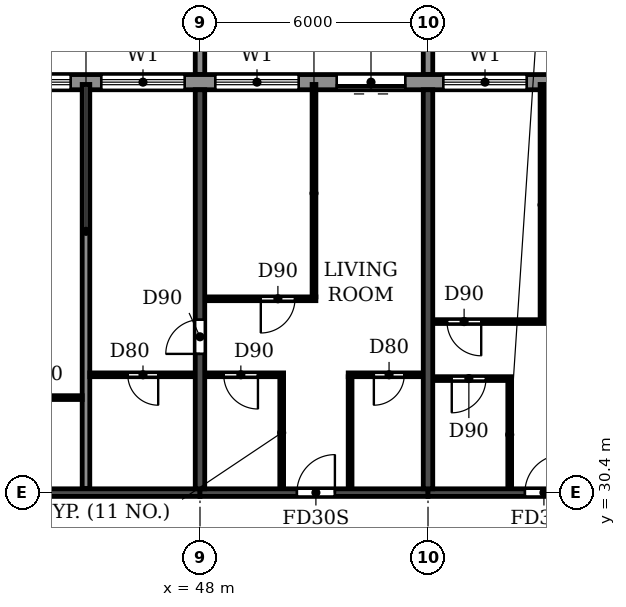
"""IFC4 building model, lengths in metres.
Left out: names, types, materials, properties, quantities, classifications, styles, units other than length and angle.
Written with IfcOpenShell. Run it as: python <this file> out.ifc"""

import sys

from ifc_helpers import new_model, si_unit, direction, frame, frame_2d, origin, place, context, subcontext, project, spatial, polyline, rectangle, outline, extrude, source, transform, mapped, element, fill, save


model = new_model("IFC4")
c1 = context("Model", 3, precision=1e-05, world=origin(), true_north=direction((0.0, 1.0)))
c2 = subcontext(c1, "Body", "Model", "MODEL_VIEW")
j1 = project(units=[si_unit("LENGTHUNIT", "METRE"), si_unit("PLANEANGLEUNIT", "RADIAN")], contexts=[c1])
p1 = place(None, origin())
s1 = spatial("IfcSite", under=j1, at=p1, CompositionType="ELEMENT")
p2 = place(p1, origin())
s2 = spatial("IfcBuilding", under=s1, at=p2, CompositionType="ELEMENT")
p3 = place(p2, frame((0.0, 0.0, 175.2)))
s3 = spatial("IfcBuildingStorey", under=s2, at=p3, CompositionType="ELEMENT", Elevation=175.2)
p4 = place(p3, frame((48.0, 30.5, 0.0), z_axis=(0.0, 0.0, 1.0), x_axis=(0.0, 1.0, 0.0)))
e1 = element("IfcWall", 1, at=p4, inside=s3, PredefinedType="SHEAR", context=c2, shape_type="SweptSolid", body=[
    extrude(rectangle(XDim=10.5, YDim=0.25, at=frame_2d((5.25, 0.0))), origin(), (0.0, 0.0, 1.0), 3.08),
])
p5 = place(p4, frame((3.55, 0.0, 0.0)))
e2 = element("IfcOpeningElement", 2, at=p5, cuts=e1, PredefinedType="OPENING", context=c2, shape_type="SweptSolid", body=[
    extrude(rectangle(XDim=0.9, YDim=2.1, at=frame_2d((0.45, 1.05))), frame((0.0, 0.135, 0.0), z_axis=(0.0, -1.0, 0.0), x_axis=(1.0, 0.0, 0.0)), (0.0, 0.0, 1.0), 0.27),
])
p6 = place(p3, frame((54.0, 30.5, 0.0), z_axis=(0.0, 0.0, 1.0), x_axis=(0.0, 1.0, 0.0)))
e3 = element("IfcWall", 3, at=p6, inside=s3, PredefinedType="SHEAR", context=c2, shape_type="SweptSolid", body=[
    extrude(rectangle(XDim=10.5, YDim=0.25, at=frame_2d((5.25, 0.0))), origin(), (0.0, 0.0, 1.0), 3.08),
])
p7 = place(p3, frame((42.0, 30.4, 0.0), z_axis=(0.0, 0.0, 1.0), x_axis=(1.0, 0.0, 0.0)))
e4 = element("IfcWall", 4, at=p7, inside=s3, PredefinedType="SHEAR", context=c2, shape_type="SweptSolid", body=[
    extrude(rectangle(XDim=6.0, YDim=0.2, at=frame_2d((3.0, 0.0))), origin(), (0.0, 0.0, 1.0), 2.48),
])
p8 = place(p3, frame((48.0, 30.4, 0.0), z_axis=(0.0, 0.0, 1.0), x_axis=(1.0, 0.0, 0.0)))
e5 = element("IfcWall", 5, at=p8, inside=s3, PredefinedType="SHEAR", context=c2, shape_type="SweptSolid", body=[
    extrude(rectangle(XDim=6.0, YDim=0.2, at=frame_2d((3.0, 0.0))), origin(), (0.0, 0.0, 1.0), 2.48),
])
p9 = place(p8, frame((2.55, 0.0, 0.0)))
e6 = element("IfcOpeningElement", 6, at=p9, cuts=e5, PredefinedType="OPENING", context=c2, shape_type="SweptSolid", body=[
    extrude(rectangle(XDim=1.0, YDim=2.1, at=frame_2d((0.5, 1.05))), frame((0.0, 0.11, 0.0), z_axis=(0.0, -1.0, 0.0), x_axis=(1.0, 0.0, 0.0)), (0.0, 0.0, 1.0), 0.22),
])
p10 = place(p3, frame((54.0, 30.4, 0.0), z_axis=(0.0, 0.0, 1.0), x_axis=(1.0, 0.0, 0.0)))
e7 = element("IfcWall", 7, at=p10, inside=s3, PredefinedType="SHEAR", context=c2, shape_type="SweptSolid", body=[
    extrude(rectangle(XDim=6.0, YDim=0.2, at=frame_2d((3.0, 0.0))), origin(), (0.0, 0.0, 1.0), 2.48),
])
p11 = place(p10, frame((2.55, 0.0, 0.0)))
e8 = element("IfcOpeningElement", 8, at=p11, cuts=e7, PredefinedType="OPENING", context=c2, shape_type="SweptSolid", body=[
    extrude(rectangle(XDim=1.0, YDim=2.1, at=frame_2d((0.5, 1.05))), frame((0.0, 0.11, 0.0), z_axis=(0.0, -1.0, 0.0), x_axis=(1.0, 0.0, 0.0)), (0.0, 0.0, 1.0), 0.22),
])
p12 = place(p3, frame((79.317, 41.2, 0.0), z_axis=(0.0, 0.0, 1.0), x_axis=(-1.0, 0.0, 0.0)))
e9 = element("IfcWall", 9, at=p12, inside=s3, PredefinedType="STANDARD", context=c2, shape_type="SweptSolid", body=[
    extrude(rectangle(XDim=56.634, YDim=0.4, at=frame_2d((28.317, 0.0))), origin(), (0.0, 0.0, 1.0), 3.08),
])
p13 = place(p12, frame((52.717, 0.0, 0.9)))
e10 = element("IfcOpeningElement", 10, at=p13, cuts=e9, PredefinedType="OPENING", context=c2, shape_type="SweptSolid", body=[
    extrude(rectangle(XDim=2.2, YDim=1.5, at=frame_2d((1.1, 0.75))), frame((0.0, 0.21, 0.0), z_axis=(0.0, -1.0, 0.0), x_axis=(1.0, 0.0, 0.0)), (0.0, 0.0, 1.0), 0.42),
])
p14 = place(p12, frame((49.917, 0.0, 0.0)))
e11 = element("IfcOpeningElement", 11, at=p14, cuts=e9, PredefinedType="OPENING", context=c2, shape_type="SweptSolid", body=[
    extrude(rectangle(XDim=1.8, YDim=2.4, at=frame_2d((0.9, 1.2))), frame((0.0, 0.21, 0.0), z_axis=(0.0, -1.0, 0.0), x_axis=(1.0, 0.0, 0.0)), (0.0, 0.0, 1.0), 0.42),
])
p15 = place(p12, frame((46.717, 0.0, 0.9)))
e12 = element("IfcOpeningElement", 12, at=p15, cuts=e9, PredefinedType="OPENING", context=c2, shape_type="SweptSolid", body=[
    extrude(rectangle(XDim=2.2, YDim=1.5, at=frame_2d((1.1, 0.75))), frame((0.0, 0.21, 0.0), z_axis=(0.0, -1.0, 0.0), x_axis=(1.0, 0.0, 0.0)), (0.0, 0.0, 1.0), 0.42),
])
p16 = place(p12, frame((43.717, 0.0, 0.9)))
e13 = element("IfcOpeningElement", 13, at=p16, cuts=e9, PredefinedType="OPENING", context=c2, shape_type="SweptSolid", body=[
    extrude(rectangle(XDim=2.2, YDim=1.5, at=frame_2d((1.1, 0.75))), frame((0.0, 0.21, 0.0), z_axis=(0.0, -1.0, 0.0), x_axis=(1.0, 0.0, 0.0)), (0.0, 0.0, 1.0), 0.42),
])
p17 = place(p12, frame((40.917, 0.0, 0.0)))
e14 = element("IfcOpeningElement", 14, at=p17, cuts=e9, PredefinedType="OPENING", context=c2, shape_type="SweptSolid", body=[
    extrude(rectangle(XDim=1.8, YDim=2.4, at=frame_2d((0.9, 1.2))), frame((0.0, 0.21, 0.0), z_axis=(0.0, -1.0, 0.0), x_axis=(1.0, 0.0, 0.0)), (0.0, 0.0, 1.0), 0.42),
])
p18 = place(p12, frame((37.717, 0.0, 0.9)))
e15 = element("IfcOpeningElement", 15, at=p18, cuts=e9, PredefinedType="OPENING", context=c2, shape_type="SweptSolid", body=[
    extrude(rectangle(XDim=2.2, YDim=1.5, at=frame_2d((1.1, 0.75))), frame((0.0, 0.21, 0.0), z_axis=(0.0, -1.0, 0.0), x_axis=(1.0, 0.0, 0.0)), (0.0, 0.0, 1.0), 0.42),
])
p19 = place(p12, frame((34.717, 0.0, 0.9)))
e16 = element("IfcOpeningElement", 16, at=p19, cuts=e9, PredefinedType="OPENING", context=c2, shape_type="SweptSolid", body=[
    extrude(rectangle(XDim=2.2, YDim=1.5, at=frame_2d((1.1, 0.75))), frame((0.0, 0.21, 0.0), z_axis=(0.0, -1.0, 0.0), x_axis=(1.0, 0.0, 0.0)), (0.0, 0.0, 1.0), 0.42),
])
p20 = place(p12, frame((31.717, 0.0, 0.9)))
e17 = element("IfcOpeningElement", 17, at=p20, cuts=e9, PredefinedType="OPENING", context=c2, shape_type="SweptSolid", body=[
    extrude(rectangle(XDim=2.2, YDim=1.5, at=frame_2d((1.1, 0.75))), frame((0.0, 0.21, 0.0), z_axis=(0.0, -1.0, 0.0), x_axis=(1.0, 0.0, 0.0)), (0.0, 0.0, 1.0), 0.42),
])
p21 = place(p12, frame((28.717, 0.0, 0.9)))
e18 = element("IfcOpeningElement", 18, at=p21, cuts=e9, PredefinedType="OPENING", context=c2, shape_type="SweptSolid", body=[
    extrude(rectangle(XDim=2.2, YDim=1.5, at=frame_2d((1.1, 0.75))), frame((0.0, 0.21, 0.0), z_axis=(0.0, -1.0, 0.0), x_axis=(1.0, 0.0, 0.0)), (0.0, 0.0, 1.0), 0.42),
])
p22 = place(p12, frame((25.917, 0.0, 0.0)))
e19 = element("IfcOpeningElement", 19, at=p22, cuts=e9, PredefinedType="OPENING", context=c2, shape_type="SweptSolid", body=[
    extrude(rectangle(XDim=1.8, YDim=2.4, at=frame_2d((0.9, 1.2))), frame((0.0, 0.21, 0.0), z_axis=(0.0, -1.0, 0.0), x_axis=(1.0, 0.0, 0.0)), (0.0, 0.0, 1.0), 0.42),
])
p23 = place(p12, frame((22.717, 0.0, 0.9)))
e20 = element("IfcOpeningElement", 20, at=p23, cuts=e9, PredefinedType="OPENING", context=c2, shape_type="SweptSolid", body=[
    extrude(rectangle(XDim=2.2, YDim=1.5, at=frame_2d((1.1, 0.75))), frame((0.0, 0.21, 0.0), z_axis=(0.0, -1.0, 0.0), x_axis=(1.0, 0.0, 0.0)), (0.0, 0.0, 1.0), 0.42),
])
p24 = place(p12, frame((19.917, 0.0, 0.0)))
e21 = element("IfcOpeningElement", 21, at=p24, cuts=e9, PredefinedType="OPENING", context=c2, shape_type="SweptSolid", body=[
    extrude(rectangle(XDim=1.8, YDim=2.4, at=frame_2d((0.9, 1.2))), frame((0.0, 0.21, 0.0), z_axis=(0.0, -1.0, 0.0), x_axis=(1.0, 0.0, 0.0)), (0.0, 0.0, 1.0), 0.42),
])
p25 = place(p12, frame((16.717, 0.0, 0.9)))
e22 = element("IfcOpeningElement", 22, at=p25, cuts=e9, PredefinedType="OPENING", context=c2, shape_type="SweptSolid", body=[
    extrude(rectangle(XDim=2.2, YDim=1.5, at=frame_2d((1.1, 0.75))), frame((0.0, 0.21, 0.0), z_axis=(0.0, -1.0, 0.0), x_axis=(1.0, 0.0, 0.0)), (0.0, 0.0, 1.0), 0.42),
])
p26 = place(p12, frame((13.717, 0.0, 0.9)))
e23 = element("IfcOpeningElement", 23, at=p26, cuts=e9, PredefinedType="OPENING", context=c2, shape_type="SweptSolid", body=[
    extrude(rectangle(XDim=2.2, YDim=1.5, at=frame_2d((1.1, 0.75))), frame((0.0, 0.21, 0.0), z_axis=(0.0, -1.0, 0.0), x_axis=(1.0, 0.0, 0.0)), (0.0, 0.0, 1.0), 0.42),
])
p27 = place(p12, frame((10.917, 0.0, 0.0)))
e24 = element("IfcOpeningElement", 24, at=p27, cuts=e9, PredefinedType="OPENING", context=c2, shape_type="SweptSolid", body=[
    extrude(rectangle(XDim=1.8, YDim=2.4, at=frame_2d((0.9, 1.2))), frame((0.0, 0.21, 0.0), z_axis=(0.0, -1.0, 0.0), x_axis=(1.0, 0.0, 0.0)), (0.0, 0.0, 1.0), 0.42),
])
p28 = place(p12, frame((7.717, 0.0, 0.9)))
e25 = element("IfcOpeningElement", 25, at=p28, cuts=e9, PredefinedType="OPENING", context=c2, shape_type="SweptSolid", body=[
    extrude(rectangle(XDim=2.2, YDim=1.5, at=frame_2d((1.1, 0.75))), frame((0.0, 0.21, 0.0), z_axis=(0.0, -1.0, 0.0), x_axis=(1.0, 0.0, 0.0)), (0.0, 0.0, 1.0), 0.42),
])
p29 = place(p12, frame((4.717, 0.0, 0.9)))
e26 = element("IfcOpeningElement", 26, at=p29, cuts=e9, PredefinedType="OPENING", context=c2, shape_type="SweptSolid", body=[
    extrude(rectangle(XDim=2.2, YDim=1.5, at=frame_2d((1.1, 0.75))), frame((0.0, 0.21, 0.0), z_axis=(0.0, -1.0, 0.0), x_axis=(1.0, 0.0, 0.0)), (0.0, 0.0, 1.0), 0.42),
])
p30 = place(p12, frame((1.917, 0.0, 0.0)))
e27 = element("IfcOpeningElement", 27, at=p30, cuts=e9, PredefinedType="OPENING", context=c2, shape_type="SweptSolid", body=[
    extrude(rectangle(XDim=1.8, YDim=2.4, at=frame_2d((0.9, 1.2))), frame((0.0, 0.21, 0.0), z_axis=(0.0, -1.0, 0.0), x_axis=(1.0, 0.0, 0.0)), (0.0, 0.0, 1.0), 0.42),
])
m1 = source(origin(), c2, "Body", "SweptSolid", [
    extrude(outline(polyline([(0.0, 0.0), (0.25, 0.0), (0.25, 3.1), (0.0, 3.1), (0.0, 0.0)])), origin(), (0.0, 0.0, 1.0), 3.1),
])
for number, where in (
    (28, (47.875, 41.4, 0.0)),
    (29, (53.875, 41.4, 0.0)),
):
    element("IfcWall", number, at=place(p3, frame(where)), inside=s3, PredefinedType="STANDARD", context=c2, shape_type="MappedRepresentation", body=[
        mapped(m1, transform((0.0, 0.0, 0.0))),
    ])
p31 = place(p3, frame((45.0, 30.51, 0.0), z_axis=(0.0, 0.0, 1.0), x_axis=(0.0, 1.0, 0.0)))
e30 = element("IfcWall", 30, at=p31, inside=s3, PredefinedType="PARTITIONING", context=c2, shape_type="SweptSolid", body=[
    extrude(rectangle(XDim=10.63, YDim=0.2, at=frame_2d((5.315, 0.0))), origin(), (0.0, 0.0, 1.0), 3.08),
])
p32 = place(p3, frame((42.135, 32.9, 0.0), z_axis=(0.0, 0.0, 1.0), x_axis=(1.0, 0.0, 0.0)))
e31 = element("IfcWall", 31, at=p32, inside=s3, PredefinedType="PARTITIONING", context=c2, shape_type="SweptSolid", body=[
    extrude(rectangle(XDim=2.765, YDim=0.1, at=frame_2d((1.382, 0.0))), origin(), (0.0, 0.0, 1.0), 3.08),
])
p33 = place(p32, frame((0.965, 0.0, 0.0)))
e32 = element("IfcOpeningElement", 32, at=p33, cuts=e31, PredefinedType="OPENING", context=c2, shape_type="SweptSolid", body=[
    extrude(rectangle(XDim=0.8, YDim=2.1, at=frame_2d((0.4, 1.05))), frame((0.0, 0.06, 0.0), z_axis=(0.0, -1.0, 0.0), x_axis=(1.0, 0.0, 0.0)), (0.0, 0.0, 1.0), 0.12),
])
p34 = place(p3, frame((54.135, 33.4, 0.0), z_axis=(0.0, 0.0, 1.0), x_axis=(1.0, 0.0, 0.0)))
e33 = element("IfcWall", 33, at=p34, inside=s3, PredefinedType="PARTITIONING", context=c2, shape_type="SweptSolid", body=[
    extrude(rectangle(XDim=2.065, YDim=0.1, at=frame_2d((1.032, 0.0))), origin(), (0.0, 0.0, 1.0), 3.08),
])
p35 = place(p34, frame((0.49, 0.0, 0.0)))
e34 = element("IfcOpeningElement", 34, at=p35, cuts=e33, PredefinedType="OPENING", context=c2, shape_type="SweptSolid", body=[
    extrude(rectangle(XDim=0.9, YDim=2.1, at=frame_2d((0.45, 1.05))), frame((0.0, 0.06, 0.0), z_axis=(0.0, -1.0, 0.0), x_axis=(1.0, 0.0, 0.0)), (0.0, 0.0, 1.0), 0.12),
])
p36 = place(p3, frame((45.1, 33.5, 0.0), z_axis=(0.0, 0.0, 1.0), x_axis=(1.0, 0.0, 0.0)))
e35 = element("IfcWall", 35, at=p36, inside=s3, PredefinedType="PARTITIONING", context=c2, shape_type="SweptSolid", body=[
    extrude(rectangle(XDim=2.765, YDim=0.1, at=frame_2d((1.382, 0.0))), origin(), (0.0, 0.0, 1.0), 3.08),
])
p37 = place(p36, frame((1.0, 0.0, 0.0)))
e36 = element("IfcOpeningElement", 36, at=p37, cuts=e35, PredefinedType="OPENING", context=c2, shape_type="SweptSolid", body=[
    extrude(rectangle(XDim=0.8, YDim=2.1, at=frame_2d((0.4, 1.05))), frame((0.0, 0.06, 0.0), z_axis=(0.0, -1.0, 0.0), x_axis=(1.0, 0.0, 0.0)), (0.0, 0.0, 1.0), 0.12),
])
p38 = place(p3, frame((48.135, 33.5, 0.0), z_axis=(0.0, 0.0, 1.0), x_axis=(1.0, 0.0, 0.0)))
e37 = element("IfcWall", 37, at=p38, inside=s3, PredefinedType="PARTITIONING", context=c2, shape_type="SweptSolid", body=[
    extrude(rectangle(XDim=2.065, YDim=0.1, at=frame_2d((1.032, 0.0))), origin(), (0.0, 0.0, 1.0), 3.08),
])
p39 = place(p38, frame((0.49, 0.0, 0.0)))
e38 = element("IfcOpeningElement", 38, at=p39, cuts=e37, PredefinedType="OPENING", context=c2, shape_type="SweptSolid", body=[
    extrude(rectangle(XDim=0.9, YDim=2.1, at=frame_2d((0.45, 1.05))), frame((0.0, 0.06, 0.0), z_axis=(0.0, -1.0, 0.0), x_axis=(1.0, 0.0, 0.0)), (0.0, 0.0, 1.0), 0.12),
])
p40 = place(p3, frame((51.9, 33.5, 0.0), z_axis=(0.0, 0.0, 1.0), x_axis=(1.0, 0.0, 0.0)))
e39 = element("IfcWall", 39, at=p40, inside=s3, PredefinedType="PARTITIONING", context=c2, shape_type="SweptSolid", body=[
    extrude(rectangle(XDim=1.965, YDim=0.1, at=frame_2d((0.982, 0.0))), origin(), (0.0, 0.0, 1.0), 3.08),
])
p41 = place(p40, frame((0.675, 0.0, 0.0)))
e40 = element("IfcOpeningElement", 40, at=p41, cuts=e39, PredefinedType="OPENING", context=c2, shape_type="SweptSolid", body=[
    extrude(rectangle(XDim=0.8, YDim=2.1, at=frame_2d((0.4, 1.05))), frame((0.0, 0.06, 0.0), z_axis=(0.0, -1.0, 0.0), x_axis=(1.0, 0.0, 0.0)), (0.0, 0.0, 1.0), 0.12),
])
p42 = place(p3, frame((54.135, 34.9, 0.0), z_axis=(0.0, 0.0, 1.0), x_axis=(1.0, 0.0, 0.0)))
e41 = element("IfcWall", 41, at=p42, inside=s3, PredefinedType="PARTITIONING", context=c2, shape_type="SweptSolid", body=[
    extrude(rectangle(XDim=2.915, YDim=0.1, at=frame_2d((1.458, 0.0))), origin(), (0.0, 0.0, 1.0), 3.08),
])
p43 = place(p42, frame((0.365, 0.0, 0.0)))
e42 = element("IfcOpeningElement", 42, at=p43, cuts=e41, PredefinedType="OPENING", context=c2, shape_type="SweptSolid", body=[
    extrude(rectangle(XDim=0.9, YDim=2.1, at=frame_2d((0.45, 1.05))), frame((0.0, 0.06, 0.0), z_axis=(0.0, -1.0, 0.0), x_axis=(1.0, 0.0, 0.0)), (0.0, 0.0, 1.0), 0.12),
])
p44 = place(p3, frame((48.135, 35.5, 0.0), z_axis=(0.0, 0.0, 1.0), x_axis=(1.0, 0.0, 0.0)))
e43 = element("IfcWall", 43, at=p44, inside=s3, PredefinedType="PARTITIONING", context=c2, shape_type="SweptSolid", body=[
    extrude(rectangle(XDim=2.915, YDim=0.1, at=frame_2d((1.458, 0.0))), origin(), (0.0, 0.0, 1.0), 3.08),
])
p45 = place(p44, frame((1.465, 0.0, 0.0)))
e44 = element("IfcOpeningElement", 44, at=p45, cuts=e43, PredefinedType="OPENING", context=c2, shape_type="SweptSolid", body=[
    extrude(rectangle(XDim=0.9, YDim=2.1, at=frame_2d((0.45, 1.05))), frame((0.0, 0.06, 0.0), z_axis=(0.0, -1.0, 0.0), x_axis=(1.0, 0.0, 0.0)), (0.0, 0.0, 1.0), 0.12),
])
p46 = place(p3, frame((50.15, 30.51, 0.0), z_axis=(0.0, 0.0, 1.0), x_axis=(0.0, 1.0, 0.0)))
e45 = element("IfcWall", 45, at=p46, inside=s3, PredefinedType="PARTITIONING", context=c2, shape_type="SweptSolid", body=[
    extrude(rectangle(XDim=2.94, YDim=0.1, at=frame_2d((1.47, 0.0))), origin(), (0.0, 0.0, 1.0), 3.08),
])
p47 = place(p3, frame((51.0, 35.55, 0.0), z_axis=(0.0, 0.0, 1.0), x_axis=(0.0, 1.0, 0.0)))
e46 = element("IfcWall", 46, at=p47, inside=s3, PredefinedType="PARTITIONING", context=c2, shape_type="SweptSolid", body=[
    extrude(rectangle(XDim=5.59, YDim=0.1, at=frame_2d((2.795, 0.0))), origin(), (0.0, 0.0, 1.0), 3.08),
])
p48 = place(p3, frame((51.95, 30.51, 0.0), z_axis=(0.0, 0.0, 1.0), x_axis=(0.0, 1.0, 0.0)))
e47 = element("IfcWall", 47, at=p48, inside=s3, PredefinedType="PARTITIONING", context=c2, shape_type="SweptSolid", body=[
    extrude(rectangle(XDim=2.94, YDim=0.1, at=frame_2d((1.47, 0.0))), origin(), (0.0, 0.0, 1.0), 3.08),
])
p49 = place(p3, frame((56.15, 30.51, 0.0), z_axis=(0.0, 0.0, 1.0), x_axis=(0.0, 1.0, 0.0)))
e48 = element("IfcWall", 48, at=p49, inside=s3, PredefinedType="PARTITIONING", context=c2, shape_type="SweptSolid", body=[
    extrude(rectangle(XDim=2.84, YDim=0.1, at=frame_2d((1.42, 0.0))), origin(), (0.0, 0.0, 1.0), 3.08),
])
p50 = place(p3, frame((57.0, 34.95, 0.0), z_axis=(0.0, 0.0, 1.0), x_axis=(0.0, 1.0, 0.0)))
e49 = element("IfcWall", 49, at=p50, inside=s3, PredefinedType="PARTITIONING", context=c2, shape_type="SweptSolid", body=[
    extrude(rectangle(XDim=6.19, YDim=0.1, at=frame_2d((3.095, 0.0))), origin(), (0.0, 0.0, 1.0), 3.08),
])
p51 = place(p19, origin())
e50 = element("IfcWindow", 50, at=p51, inside=s3, PartitioningType="DOUBLE_PANEL_HORIZONTAL", PredefinedType="WINDOW", context=c2, shape_type="SweptSolid", body=[
    extrude(rectangle(XDim=2.2, YDim=1.5, at=frame_2d((1.1, 0.75))), frame((0.0, 0.03, 0.0), z_axis=(0.0, -1.0, 0.0), x_axis=(1.0, 0.0, 0.0)), (0.0, 0.0, 1.0), 0.06),
])
fill(e16, e50)
p52 = place(p20, origin())
e51 = element("IfcWindow", 51, at=p52, inside=s3, PartitioningType="DOUBLE_PANEL_HORIZONTAL", PredefinedType="WINDOW", context=c2, shape_type="SweptSolid", body=[
    extrude(rectangle(XDim=2.2, YDim=1.5, at=frame_2d((1.1, 0.75))), frame((0.0, 0.03, 0.0), z_axis=(0.0, -1.0, 0.0), x_axis=(1.0, 0.0, 0.0)), (0.0, 0.0, 1.0), 0.06),
])
fill(e17, e51)
p53 = place(p21, origin())
e52 = element("IfcWindow", 52, at=p53, inside=s3, PartitioningType="DOUBLE_PANEL_HORIZONTAL", PredefinedType="WINDOW", context=c2, shape_type="SweptSolid", body=[
    extrude(rectangle(XDim=2.2, YDim=1.5, at=frame_2d((1.1, 0.75))), frame((0.0, 0.03, 0.0), z_axis=(0.0, -1.0, 0.0), x_axis=(1.0, 0.0, 0.0)), (0.0, 0.0, 1.0), 0.06),
])
fill(e18, e52)
p54 = place(p22, origin())
e53 = element("IfcDoor", 53, at=p54, inside=s3, OperationType="DOUBLE_DOOR_SLIDING", PredefinedType="DOOR", context=c2, shape_type="SweptSolid", body=[
    extrude(rectangle(XDim=1.8, YDim=2.4, at=frame_2d((0.9, 1.2))), frame((0.0, 0.025, 0.0), z_axis=(0.0, -1.0, 0.0), x_axis=(1.0, 0.0, 0.0)), (0.0, 0.0, 1.0), 0.05),
])
fill(e19, e53)
p55 = place(p23, origin())
e54 = element("IfcWindow", 54, at=p55, inside=s3, PartitioningType="DOUBLE_PANEL_HORIZONTAL", PredefinedType="WINDOW", context=c2, shape_type="SweptSolid", body=[
    extrude(rectangle(XDim=2.2, YDim=1.5, at=frame_2d((1.1, 0.75))), frame((0.0, 0.03, 0.0), z_axis=(0.0, -1.0, 0.0), x_axis=(1.0, 0.0, 0.0)), (0.0, 0.0, 1.0), 0.06),
])
fill(e20, e54)
p56 = place(p37, frame((0.8, 0.0, 0.0), z_axis=(0.0, 0.0, 1.0), x_axis=(-1.0, 0.0, 0.0)))
e55 = element("IfcDoor", 55, at=p56, inside=s3, OperationType="SINGLE_SWING_LEFT", PredefinedType="DOOR", context=c2, shape_type="SweptSolid", body=[
    extrude(rectangle(XDim=0.8, YDim=2.1, at=frame_2d((0.4, 1.05))), frame((0.0, 0.025, 0.0), z_axis=(0.0, -1.0, 0.0), x_axis=(1.0, 0.0, 0.0)), (0.0, 0.0, 1.0), 0.05),
])
fill(e36, e55)
p57 = place(p5, origin())
e56 = element("IfcDoor", 56, at=p57, inside=s3, OperationType="SINGLE_SWING_LEFT", PredefinedType="DOOR", context=c2, shape_type="SweptSolid", body=[
    extrude(rectangle(XDim=0.9, YDim=2.1, at=frame_2d((0.45, 1.05))), frame((0.0, 0.025, 0.0), z_axis=(0.0, -1.0, 0.0), x_axis=(1.0, 0.0, 0.0)), (0.0, 0.0, 1.0), 0.05),
])
fill(e2, e56)
p58 = place(p39, frame((0.9, 0.0, 0.0), z_axis=(0.0, 0.0, 1.0), x_axis=(-1.0, 0.0, 0.0)))
e57 = element("IfcDoor", 57, at=p58, inside=s3, OperationType="SINGLE_SWING_LEFT", PredefinedType="DOOR", context=c2, shape_type="SweptSolid", body=[
    extrude(rectangle(XDim=0.9, YDim=2.1, at=frame_2d((0.45, 1.05))), frame((0.0, 0.025, 0.0), z_axis=(0.0, -1.0, 0.0), x_axis=(1.0, 0.0, 0.0)), (0.0, 0.0, 1.0), 0.05),
])
fill(e38, e57)
p59 = place(p45, frame((0.9, 0.0, 0.0), z_axis=(0.0, 0.0, 1.0), x_axis=(-1.0, 0.0, 0.0)))
e58 = element("IfcDoor", 58, at=p59, inside=s3, OperationType="SINGLE_SWING_RIGHT", PredefinedType="DOOR", context=c2, shape_type="SweptSolid", body=[
    extrude(rectangle(XDim=0.9, YDim=2.1, at=frame_2d((0.45, 1.05))), frame((0.0, 0.025, 0.0), z_axis=(0.0, -1.0, 0.0), x_axis=(1.0, 0.0, 0.0)), (0.0, 0.0, 1.0), 0.05),
])
fill(e44, e58)
p60 = place(p9, origin())
e59 = element("IfcDoor", 59, at=p60, inside=s3, OperationType="SINGLE_SWING_RIGHT", PredefinedType="DOOR", context=c2, shape_type="SweptSolid", body=[
    extrude(rectangle(XDim=1.0, YDim=2.1, at=frame_2d((0.5, 1.05))), frame((0.0, 0.025, 0.0), z_axis=(0.0, -1.0, 0.0), x_axis=(1.0, 0.0, 0.0)), (0.0, 0.0, 1.0), 0.05),
])
fill(e6, e59)
p61 = place(p41, frame((0.8, 0.0, 0.0), z_axis=(0.0, 0.0, 1.0), x_axis=(-1.0, 0.0, 0.0)))
e60 = element("IfcDoor", 60, at=p61, inside=s3, OperationType="SINGLE_SWING_RIGHT", PredefinedType="DOOR", context=c2, shape_type="SweptSolid", body=[
    extrude(rectangle(XDim=0.8, YDim=2.1, at=frame_2d((0.4, 1.05))), frame((0.0, 0.025, 0.0), z_axis=(0.0, -1.0, 0.0), x_axis=(1.0, 0.0, 0.0)), (0.0, 0.0, 1.0), 0.05),
])
fill(e40, e60)
p62 = place(p43, frame((0.9, 0.0, 0.0), z_axis=(0.0, 0.0, 1.0), x_axis=(-1.0, 0.0, 0.0)))
e61 = element("IfcDoor", 61, at=p62, inside=s3, OperationType="SINGLE_SWING_LEFT", PredefinedType="DOOR", context=c2, shape_type="SweptSolid", body=[
    extrude(rectangle(XDim=0.9, YDim=2.1, at=frame_2d((0.45, 1.05))), frame((0.0, 0.025, 0.0), z_axis=(0.0, -1.0, 0.0), x_axis=(1.0, 0.0, 0.0)), (0.0, 0.0, 1.0), 0.05),
])
fill(e42, e61)
p63 = place(p35, frame((0.9, 0.0, 0.0), z_axis=(0.0, 0.0, 1.0), x_axis=(-1.0, 0.0, 0.0)))
e62 = element("IfcDoor", 62, at=p63, inside=s3, OperationType="SINGLE_SWING_RIGHT", PredefinedType="DOOR", context=c2, shape_type="SweptSolid", body=[
    extrude(rectangle(XDim=0.9, YDim=2.1, at=frame_2d((0.45, 1.05))), frame((0.0, 0.025, 0.0), z_axis=(0.0, -1.0, 0.0), x_axis=(1.0, 0.0, 0.0)), (0.0, 0.0, 1.0), 0.05),
])
fill(e34, e62)
p64 = place(p11, origin())
e63 = element("IfcDoor", 63, at=p64, inside=s3, OperationType="SINGLE_SWING_RIGHT", PredefinedType="DOOR", context=c2, shape_type="SweptSolid", body=[
    extrude(rectangle(XDim=1.0, YDim=2.1, at=frame_2d((0.5, 1.05))), frame((0.0, 0.025, 0.0), z_axis=(0.0, -1.0, 0.0), x_axis=(1.0, 0.0, 0.0)), (0.0, 0.0, 1.0), 0.05),
])
fill(e8, e63)
save(model, sys.argv[1])
